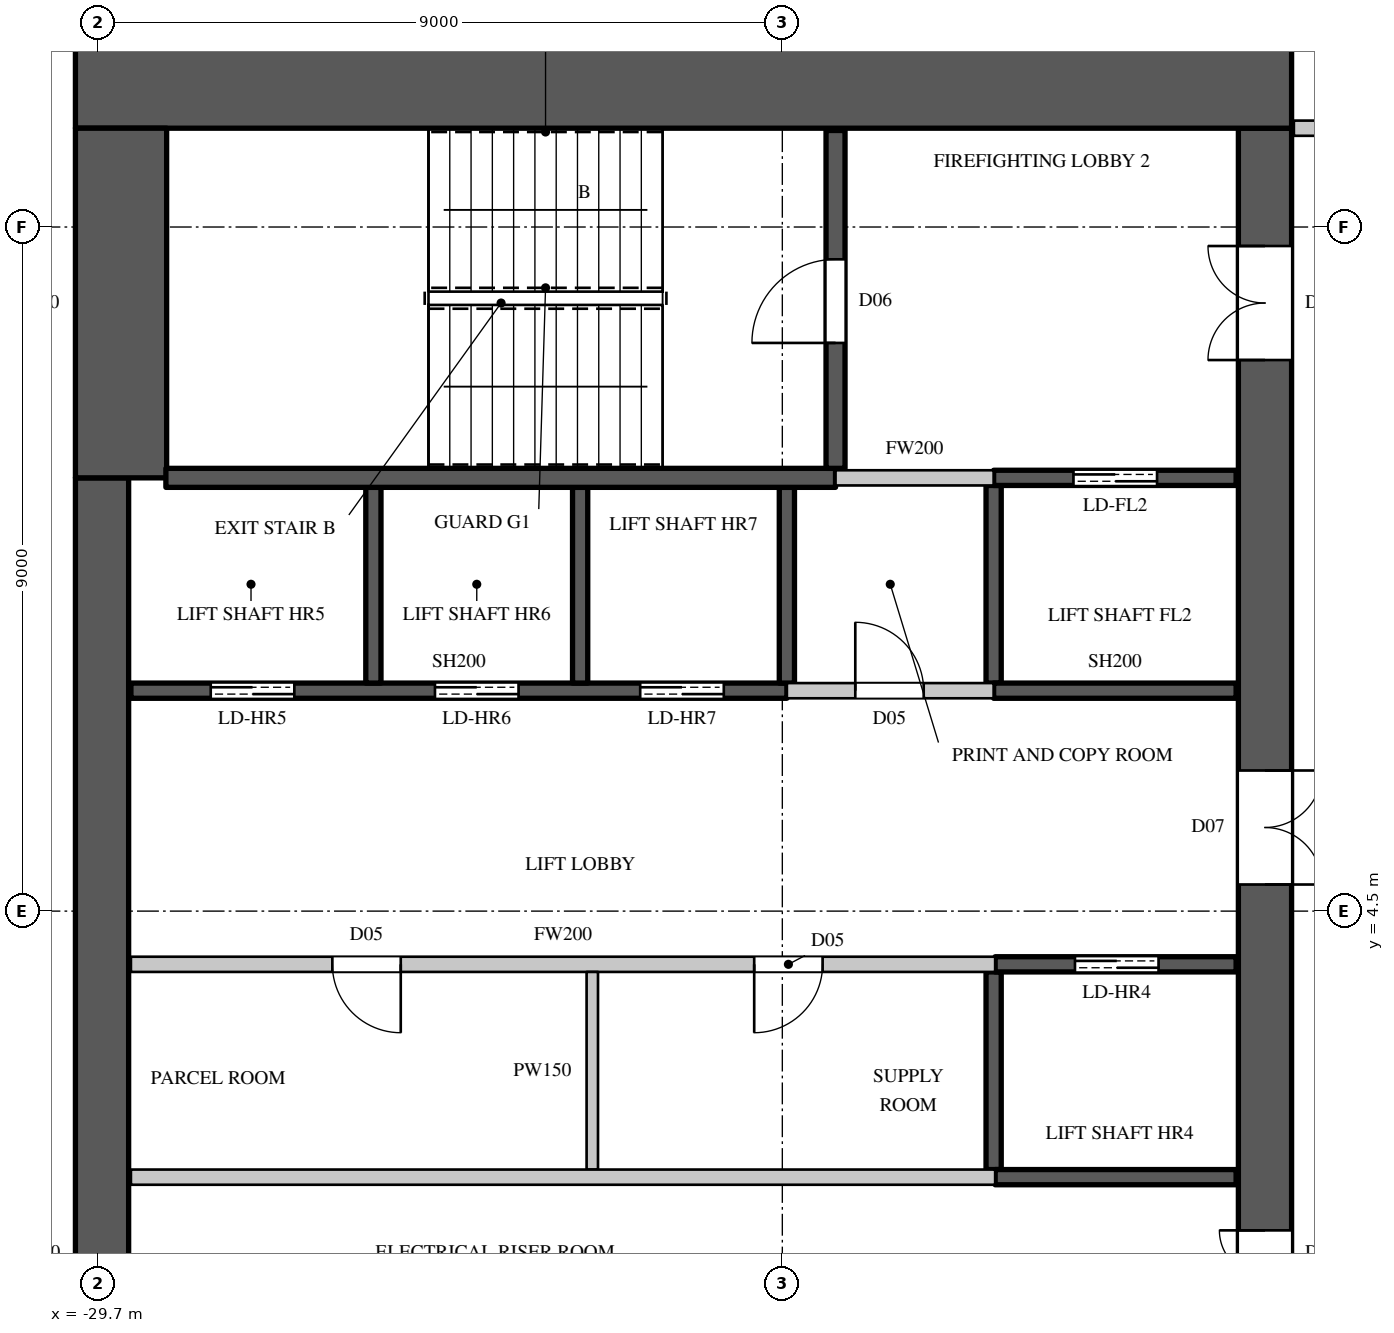
"""IFC4 building model, lengths in metres.
Left out: names, types, materials, properties, quantities, classifications, styles, units other than length and angle.
Written with IfcOpenShell. Run it as: python <this file> out.ifc"""

import sys

from ifc_helpers import new_model, si_unit, direction, frame, frame_2d, origin, place, context, subcontext, project, spatial, rectangle, extrude, element, fill, save


model = new_model("IFC4")
c1 = context("Model", 3, precision=1e-05, world=origin(), true_north=direction((0.0, 1.0)))
c2 = subcontext(c1, "Body", "Model", "MODEL_VIEW")
j1 = project(units=[si_unit("LENGTHUNIT", "METRE"), si_unit("PLANEANGLEUNIT", "RADIAN")], contexts=[c1])
p1 = place(None, origin())
s1 = spatial("IfcSite", under=j1, at=p1, CompositionType="ELEMENT")
p2 = place(p1, origin())
s2 = spatial("IfcBuilding", under=s1, at=p2, CompositionType="ELEMENT")
p3 = place(p2, frame((0.0, 0.0, 247.5)))
s3 = spatial("IfcBuildingStorey", under=s2, at=p3, CompositionType="ELEMENT", Elevation=247.5)
p4 = place(p3, frame((-30.0, 15.4, 0.0), z_axis=(0.0, 0.0, 1.0), x_axis=(1.0, 0.0, 0.0)))
e1 = element("IfcWall", 1, at=p4, inside=s3, PredefinedType="SHEAR", context=c2, shape_type="SweptSolid", body=[
    extrude(rectangle(XDim=16.0, YDim=1.2, at=frame_2d((8.0, 0.0))), origin(), (0.0, 0.0, 1.0), 4.1),
])
p5 = place(p3, frame((-14.35, -14.8, 0.0), z_axis=(0.0, 0.0, 1.0), x_axis=(0.0, 1.0, 0.0)))
e2 = element("IfcWall", 2, at=p5, inside=s3, PredefinedType="SHEAR", context=c2, shape_type="SweptSolid", body=[
    extrude(rectangle(XDim=29.6, YDim=0.7, at=frame_2d((14.8, 0.0))), origin(), (0.0, 0.0, 1.0), 4.1),
])
p6 = place(p5, frame((1.55, 0.0, 0.0)))
e3 = element("IfcOpeningElement", 3, at=p6, cuts=e2, PredefinedType="OPENING", context=c2, shape_type="SweptSolid", body=[
    extrude(rectangle(XDim=1.5, YDim=2.4, at=frame_2d((0.75, 1.2))), frame((0.0, 0.36, 0.0), z_axis=(0.0, -1.0, 0.0), x_axis=(1.0, 0.0, 0.0)), (0.0, 0.0, 1.0), 0.72),
])
p7 = place(p5, frame((26.55, 0.0, 0.0)))
e4 = element("IfcOpeningElement", 4, at=p7, cuts=e2, PredefinedType="OPENING", context=c2, shape_type="SweptSolid", body=[
    extrude(rectangle(XDim=1.5, YDim=2.4, at=frame_2d((0.75, 1.2))), frame((0.0, 0.36, 0.0), z_axis=(0.0, -1.0, 0.0), x_axis=(1.0, 0.0, 0.0)), (0.0, 0.0, 1.0), 0.72),
])
p8 = place(p5, frame((8.45, 0.0, 0.0)))
e5 = element("IfcOpeningElement", 5, at=p8, cuts=e2, PredefinedType="OPENING", context=c2, shape_type="SweptSolid", body=[
    extrude(rectangle(XDim=1.5, YDim=2.4, at=frame_2d((0.75, 1.2))), frame((0.0, 0.36, 0.0), z_axis=(0.0, -1.0, 0.0), x_axis=(1.0, 0.0, 0.0)), (0.0, 0.0, 1.0), 0.72),
])
p9 = place(p5, frame((19.65, 0.0, 0.0)))
e6 = element("IfcOpeningElement", 6, at=p9, cuts=e2, PredefinedType="OPENING", context=c2, shape_type="SweptSolid", body=[
    extrude(rectangle(XDim=1.5, YDim=2.4, at=frame_2d((0.75, 1.2))), frame((0.0, 0.36, 0.0), z_axis=(0.0, -1.0, 0.0), x_axis=(1.0, 0.0, 0.0)), (0.0, 0.0, 1.0), 0.72),
])
p10 = place(p5, frame((14.5, 0.0, 0.0)))
e7 = element("IfcOpeningElement", 7, at=p10, cuts=e2, PredefinedType="OPENING", context=c2, shape_type="SweptSolid", body=[
    extrude(rectangle(XDim=0.6, YDim=2.0, at=frame_2d((0.3, 1.0))), frame((0.0, 0.36, 0.0), z_axis=(0.0, -1.0, 0.0), x_axis=(1.0, 0.0, 0.0)), (0.0, 0.0, 1.0), 0.72),
])
p11 = place(p3, frame((-29.65, -10.2, 0.0), z_axis=(0.0, 0.0, 1.0), x_axis=(0.0, 1.0, 0.0)))
e8 = element("IfcWall", 8, at=p11, inside=s3, PredefinedType="SHEAR", context=c2, shape_type="SweptSolid", body=[
    extrude(rectangle(XDim=20.4, YDim=0.7, at=frame_2d((10.2, 0.0))), origin(), (0.0, 0.0, 1.0), 4.1),
])
p12 = place(p3, frame((-29.4, 10.2, 0.0), z_axis=(0.0, 0.0, 1.0), x_axis=(0.0, 1.0, 0.0)))
e9 = element("IfcWall", 9, at=p12, inside=s3, PredefinedType="SHEAR", context=c2, shape_type="SweptSolid", body=[
    extrude(rectangle(XDim=4.6, YDim=1.2, at=frame_2d((2.3, 0.0))), origin(), (0.0, 0.0, 1.0), 4.1),
])
p13 = place(p3, frame((-29.27, 3.8, 0.0), z_axis=(0.0, 0.0, 1.0), x_axis=(1.0, 0.0, 0.0)))
e10 = element("IfcWall", 10, at=p13, inside=s3, PredefinedType="PARTITIONING", context=c2, shape_type="SweptSolid", body=[
    extrude(rectangle(XDim=11.37, YDim=0.2, at=frame_2d((5.685, 0.0))), origin(), (0.0, 0.0, 1.0), 3.8),
])
p14 = place(p13, frame((2.65, 0.0, 0.0)))
e11 = element("IfcOpeningElement", 11, at=p14, cuts=e10, PredefinedType="OPENING", context=c2, shape_type="SweptSolid", body=[
    extrude(rectangle(XDim=0.9, YDim=2.2, at=frame_2d((0.45, 1.1))), frame((0.0, 0.11, 0.0), z_axis=(0.0, -1.0, 0.0), x_axis=(1.0, 0.0, 0.0)), (0.0, 0.0, 1.0), 0.22),
])
p15 = place(p13, frame((8.2, 0.0, 0.0)))
e12 = element("IfcOpeningElement", 12, at=p15, cuts=e10, PredefinedType="OPENING", context=c2, shape_type="SweptSolid", body=[
    extrude(rectangle(XDim=0.9, YDim=2.2, at=frame_2d((0.45, 1.1))), frame((0.0, 0.11, 0.0), z_axis=(0.0, -1.0, 0.0), x_axis=(1.0, 0.0, 0.0)), (0.0, 0.0, 1.0), 0.22),
])
p16 = place(p3, frame((-20.64, 7.4, 0.0), z_axis=(0.0, 0.0, 1.0), x_axis=(1.0, 0.0, 0.0)))
e13 = element("IfcWall", 13, at=p16, inside=s3, PredefinedType="PARTITIONING", context=c2, shape_type="SweptSolid", body=[
    extrude(rectangle(XDim=2.72, YDim=0.2, at=frame_2d((1.36, 0.0))), origin(), (0.0, 0.0, 1.0), 3.8),
])
p17 = place(p16, frame((0.9, 0.0, 0.0)))
e14 = element("IfcOpeningElement", 14, at=p17, cuts=e13, PredefinedType="OPENING", context=c2, shape_type="SweptSolid", body=[
    extrude(rectangle(XDim=0.9, YDim=2.2, at=frame_2d((0.45, 1.1))), frame((0.0, 0.11, 0.0), z_axis=(0.0, -1.0, 0.0), x_axis=(1.0, 0.0, 0.0)), (0.0, 0.0, 1.0), 0.22),
])
p18 = place(p3, frame((-20.0, 10.2, 0.0), z_axis=(0.0, 0.0, 1.0), x_axis=(1.0, 0.0, 0.0)))
e15 = element("IfcWall", 15, at=p18, inside=s3, PredefinedType="PARTITIONING", context=c2, shape_type="SweptSolid", body=[
    extrude(rectangle(XDim=2.08, YDim=0.2, at=frame_2d((1.04, 0.0))), origin(), (0.0, 0.0, 1.0), 3.8),
])
p19 = place(p3, frame((-13.97, 14.8, 0.0), z_axis=(0.0, 0.0, 1.0), x_axis=(1.0, 0.0, 0.0)))
e16 = element("IfcWall", 16, at=p19, inside=s3, PredefinedType="PARTITIONING", context=c2, shape_type="SweptSolid", body=[
    extrude(rectangle(XDim=2.87, YDim=0.2, at=frame_2d((1.435, 0.0))), origin(), (0.0, 0.0, 1.0), 3.8),
])
p20 = place(p3, frame((-23.2, 1.1, 0.0), z_axis=(0.0, 0.0, 1.0), x_axis=(0.0, 1.0, 0.0)))
e17 = element("IfcWall", 17, at=p20, inside=s3, PredefinedType="PARTITIONING", context=c2, shape_type="SweptSolid", body=[
    extrude(rectangle(XDim=2.6, YDim=0.15, at=frame_2d((1.3, 0.0))), origin(), (0.0, 0.0, 1.0), 3.8),
])
p21 = place(p3, frame((-29.27, 1.0, 0.0), z_axis=(0.0, 0.0, 1.0), x_axis=(1.0, 0.0, 0.0)))
e18 = element("IfcWall", 18, at=p21, inside=s3, PredefinedType="PARTITIONING", context=c2, shape_type="SweptSolid", body=[
    extrude(rectangle(XDim=11.37, YDim=0.2, at=frame_2d((5.685, 0.0))), origin(), (0.0, 0.0, 1.0), 3.8),
])
p22 = place(p3, frame((-29.27, 7.4, 0.0), z_axis=(0.0, 0.0, 1.0), x_axis=(1.0, 0.0, 0.0)))
e19 = element("IfcWall", 19, at=p22, inside=s3, PredefinedType="SHEAR", context=c2, shape_type="SweptSolid", body=[
    extrude(rectangle(XDim=8.63, YDim=0.2, at=frame_2d((4.315, 0.0))), origin(), (0.0, 0.0, 1.0), 3.8),
])
p23 = place(p22, frame((1.05, 0.0, 0.0)))
e20 = element("IfcOpeningElement", 20, at=p23, cuts=e19, PredefinedType="OPENING", context=c2, shape_type="SweptSolid", body=[
    extrude(rectangle(XDim=1.1, YDim=2.2, at=frame_2d((0.55, 1.1))), frame((0.0, 0.11, 0.0), z_axis=(0.0, -1.0, 0.0), x_axis=(1.0, 0.0, 0.0)), (0.0, 0.0, 1.0), 0.22),
])
p24 = place(p22, frame((4.0, 0.0, 0.0)))
e21 = element("IfcOpeningElement", 21, at=p24, cuts=e19, PredefinedType="OPENING", context=c2, shape_type="SweptSolid", body=[
    extrude(rectangle(XDim=1.1, YDim=2.2, at=frame_2d((0.55, 1.1))), frame((0.0, 0.11, 0.0), z_axis=(0.0, -1.0, 0.0), x_axis=(1.0, 0.0, 0.0)), (0.0, 0.0, 1.0), 0.22),
])
p25 = place(p22, frame((6.7, 0.0, 0.0)))
e22 = element("IfcOpeningElement", 22, at=p25, cuts=e19, PredefinedType="OPENING", context=c2, shape_type="SweptSolid", body=[
    extrude(rectangle(XDim=1.1, YDim=2.2, at=frame_2d((0.55, 1.1))), frame((0.0, 0.11, 0.0), z_axis=(0.0, -1.0, 0.0), x_axis=(1.0, 0.0, 0.0)), (0.0, 0.0, 1.0), 0.22),
])
for number, where, z_axis, x_axis in (
    (23, (-26.08, 7.5, 0.0), (0.0, 0.0, 1.0), (0.0, 1.0, 0.0)),
    (24, (-23.36, 7.5, 0.0), (0.0, 0.0, 1.0), (0.0, 1.0, 0.0)),
):
    element("IfcWall", number, at=place(p3, frame(where, z_axis=z_axis, x_axis=x_axis)), inside=s3, PredefinedType="SHEAR", context=c2, shape_type="SweptSolid", body=[
        extrude(rectangle(XDim=2.575, YDim=0.2, at=frame_2d((1.288, 0.0))), origin(), (0.0, 0.0, 1.0), 4.1),
    ])
p26 = place(p3, frame((-20.64, 7.5, 0.0), z_axis=(0.0, 0.0, 1.0), x_axis=(0.0, 1.0, 0.0)))
e25 = element("IfcWall", 25, at=p26, inside=s3, PredefinedType="SHEAR", context=c2, shape_type="SweptSolid", body=[
    extrude(rectangle(XDim=2.575, YDim=0.2, at=frame_2d((1.288, 0.0))), origin(), (0.0, 0.0, 1.0), 3.8),
])
p27 = place(p3, frame((-17.92, 1.1, 0.0), z_axis=(0.0, 0.0, 1.0), x_axis=(0.0, 1.0, 0.0)))
e26 = element("IfcWall", 26, at=p27, inside=s3, PredefinedType="SHEAR", context=c2, shape_type="SweptSolid", body=[
    extrude(rectangle(XDim=2.6, YDim=0.2, at=frame_2d((1.3, 0.0))), origin(), (0.0, 0.0, 1.0), 3.8),
])
p28 = place(p3, frame((-17.9, 1.0, 0.0), z_axis=(0.0, 0.0, 1.0), x_axis=(1.0, 0.0, 0.0)))
e27 = element("IfcWall", 27, at=p28, inside=s3, PredefinedType="SHEAR", context=c2, shape_type="SweptSolid", body=[
    extrude(rectangle(XDim=3.17, YDim=0.2, at=frame_2d((1.585, 0.0))), origin(), (0.0, 0.0, 1.0), 3.8),
])
p29 = place(p3, frame((-17.9, 3.8, 0.0), z_axis=(0.0, 0.0, 1.0), x_axis=(1.0, 0.0, 0.0)))
e28 = element("IfcWall", 28, at=p29, inside=s3, PredefinedType="SHEAR", context=c2, shape_type="SweptSolid", body=[
    extrude(rectangle(XDim=3.17, YDim=0.2, at=frame_2d((1.585, 0.0))), origin(), (0.0, 0.0, 1.0), 3.8),
])
p30 = place(p29, frame((1.05, 0.0, 0.0)))
e29 = element("IfcOpeningElement", 29, at=p30, cuts=e28, PredefinedType="OPENING", context=c2, shape_type="SweptSolid", body=[
    extrude(rectangle(XDim=1.1, YDim=2.2, at=frame_2d((0.55, 1.1))), frame((0.0, 0.11, 0.0), z_axis=(0.0, -1.0, 0.0), x_axis=(1.0, 0.0, 0.0)), (0.0, 0.0, 1.0), 0.22),
])
p31 = place(p3, frame((-17.92, 7.5, 0.0), z_axis=(0.0, 0.0, 1.0), x_axis=(0.0, 1.0, 0.0)))
e30 = element("IfcWall", 30, at=p31, inside=s3, PredefinedType="SHEAR", context=c2, shape_type="SweptSolid", body=[
    extrude(rectangle(XDim=2.6, YDim=0.2, at=frame_2d((1.3, 0.0))), origin(), (0.0, 0.0, 1.0), 3.8),
])
p32 = place(p3, frame((-17.92, 7.4, 0.0), z_axis=(0.0, 0.0, 1.0), x_axis=(1.0, 0.0, 0.0)))
e31 = element("IfcWall", 31, at=p32, inside=s3, PredefinedType="SHEAR", context=c2, shape_type="SweptSolid", body=[
    extrude(rectangle(XDim=3.19, YDim=0.2, at=frame_2d((1.595, 0.0))), origin(), (0.0, 0.0, 1.0), 3.8),
])
p33 = place(p3, frame((-17.92, 10.2, 0.0), z_axis=(0.0, 0.0, 1.0), x_axis=(1.0, 0.0, 0.0)))
e32 = element("IfcWall", 32, at=p33, inside=s3, PredefinedType="SHEAR", context=c2, shape_type="SweptSolid", body=[
    extrude(rectangle(XDim=3.19, YDim=0.2, at=frame_2d((1.595, 0.0))), origin(), (0.0, 0.0, 1.0), 3.8),
])
p34 = place(p33, frame((1.05, 0.0, 0.0)))
e33 = element("IfcOpeningElement", 33, at=p34, cuts=e32, PredefinedType="OPENING", context=c2, shape_type="SweptSolid", body=[
    extrude(rectangle(XDim=1.1, YDim=2.2, at=frame_2d((0.55, 1.1))), frame((0.0, 0.11, 0.0), z_axis=(0.0, -1.0, 0.0), x_axis=(1.0, 0.0, 0.0)), (0.0, 0.0, 1.0), 0.22),
])
p35 = place(p3, frame((-28.81, 10.2, 0.0), z_axis=(0.0, 0.0, 1.0), x_axis=(1.0, 0.0, 0.0)))
e34 = element("IfcWall", 34, at=p35, inside=s3, PredefinedType="SHEAR", context=c2, shape_type="SweptSolid", body=[
    extrude(rectangle(XDim=8.81, YDim=0.25, at=frame_2d((4.405, 0.0))), origin(), (0.0, 0.0, 1.0), 3.8),
])
p36 = place(p3, frame((-20.0, 10.325, 0.0), z_axis=(0.0, 0.0, 1.0), x_axis=(0.0, 1.0, 0.0)))
e35 = element("IfcWall", 35, at=p36, inside=s3, PredefinedType="SHEAR", context=c2, shape_type="SweptSolid", body=[
    extrude(rectangle(XDim=4.445, YDim=0.25, at=frame_2d((2.223, 0.0))), origin(), (0.0, 0.0, 1.0), 3.8),
])
p37 = place(p36, frame((1.65, 0.0, 0.0)))
e36 = element("IfcOpeningElement", 36, at=p37, cuts=e35, PredefinedType="OPENING", context=c2, shape_type="SweptSolid", body=[
    extrude(rectangle(XDim=1.1, YDim=2.2, at=frame_2d((0.55, 1.1))), frame((0.0, 0.135, 0.0), z_axis=(0.0, -1.0, 0.0), x_axis=(1.0, 0.0, 0.0)), (0.0, 0.0, 1.0), 0.27),
])
p38 = place(p37, origin())
e37 = element("IfcDoor", 37, at=p38, inside=s3, OperationType="SINGLE_SWING_LEFT", PredefinedType="DOOR", context=c2, shape_type="SweptSolid", body=[
    extrude(rectangle(XDim=1.1, YDim=2.2, at=frame_2d((0.55, 1.1))), frame((0.0, 0.025, 0.0), z_axis=(0.0, -1.0, 0.0), x_axis=(1.0, 0.0, 0.0)), (0.0, 0.0, 1.0), 0.05),
])
fill(e36, e37)
p39 = place(p14, origin())
e38 = element("IfcDoor", 38, at=p39, inside=s3, OperationType="SINGLE_SWING_LEFT", PredefinedType="DOOR", context=c2, shape_type="SweptSolid", body=[
    extrude(rectangle(XDim=0.9, YDim=2.2, at=frame_2d((0.45, 1.1))), frame((0.0, 0.025, 0.0), z_axis=(0.0, -1.0, 0.0), x_axis=(1.0, 0.0, 0.0)), (0.0, 0.0, 1.0), 0.05),
])
fill(e11, e38)
p40 = place(p15, origin())
e39 = element("IfcDoor", 39, at=p40, inside=s3, OperationType="SINGLE_SWING_RIGHT", PredefinedType="DOOR", context=c2, shape_type="SweptSolid", body=[
    extrude(rectangle(XDim=0.9, YDim=2.2, at=frame_2d((0.45, 1.1))), frame((0.0, 0.025, 0.0), z_axis=(0.0, -1.0, 0.0), x_axis=(1.0, 0.0, 0.0)), (0.0, 0.0, 1.0), 0.05),
])
fill(e12, e39)
p41 = place(p17, origin())
e40 = element("IfcDoor", 40, at=p41, inside=s3, OperationType="SINGLE_SWING_LEFT", PredefinedType="DOOR", context=c2, shape_type="SweptSolid", body=[
    extrude(rectangle(XDim=0.9, YDim=2.2, at=frame_2d((0.45, 1.1))), frame((0.0, 0.025, 0.0), z_axis=(0.0, -1.0, 0.0), x_axis=(1.0, 0.0, 0.0)), (0.0, 0.0, 1.0), 0.05),
])
fill(e14, e40)
p42 = place(p30, origin())
e41 = element("IfcDoor", 41, at=p42, inside=s3, OperationType="DOUBLE_DOOR_SLIDING", PredefinedType="DOOR", context=c2, shape_type="SweptSolid", body=[
    extrude(rectangle(XDim=1.1, YDim=2.2, at=frame_2d((0.55, 1.1))), frame((0.0, 0.025, 0.0), z_axis=(0.0, -1.0, 0.0), x_axis=(1.0, 0.0, 0.0)), (0.0, 0.0, 1.0), 0.05),
])
fill(e29, e41)
p43 = place(p23, origin())
e42 = element("IfcDoor", 42, at=p43, inside=s3, OperationType="DOUBLE_DOOR_SLIDING", PredefinedType="DOOR", context=c2, shape_type="SweptSolid", body=[
    extrude(rectangle(XDim=1.1, YDim=2.2, at=frame_2d((0.55, 1.1))), frame((0.0, 0.025, 0.0), z_axis=(0.0, -1.0, 0.0), x_axis=(1.0, 0.0, 0.0)), (0.0, 0.0, 1.0), 0.05),
])
fill(e20, e42)
p44 = place(p24, origin())
e43 = element("IfcDoor", 43, at=p44, inside=s3, OperationType="DOUBLE_DOOR_SLIDING", PredefinedType="DOOR", context=c2, shape_type="SweptSolid", body=[
    extrude(rectangle(XDim=1.1, YDim=2.2, at=frame_2d((0.55, 1.1))), frame((0.0, 0.025, 0.0), z_axis=(0.0, -1.0, 0.0), x_axis=(1.0, 0.0, 0.0)), (0.0, 0.0, 1.0), 0.05),
])
fill(e21, e43)
p45 = place(p25, origin())
e44 = element("IfcDoor", 44, at=p45, inside=s3, OperationType="DOUBLE_DOOR_SLIDING", PredefinedType="DOOR", context=c2, shape_type="SweptSolid", body=[
    extrude(rectangle(XDim=1.1, YDim=2.2, at=frame_2d((0.55, 1.1))), frame((0.0, 0.025, 0.0), z_axis=(0.0, -1.0, 0.0), x_axis=(1.0, 0.0, 0.0)), (0.0, 0.0, 1.0), 0.05),
])
fill(e22, e44)
p46 = place(p34, origin())
e45 = element("IfcDoor", 45, at=p46, inside=s3, OperationType="DOUBLE_DOOR_SLIDING", PredefinedType="DOOR", context=c2, shape_type="SweptSolid", body=[
    extrude(rectangle(XDim=1.1, YDim=2.2, at=frame_2d((0.55, 1.1))), frame((0.0, 0.025, 0.0), z_axis=(0.0, -1.0, 0.0), x_axis=(1.0, 0.0, 0.0)), (0.0, 0.0, 1.0), 0.05),
])
fill(e33, e45)
p47 = place(p7, origin())
e46 = element("IfcDoor", 46, at=p47, inside=s3, OperationType="DOUBLE_DOOR_SINGLE_SWING", PredefinedType="DOOR", context=c2, shape_type="SweptSolid", body=[
    extrude(rectangle(XDim=1.5, YDim=2.4, at=frame_2d((0.75, 1.2))), frame((0.0, 0.345, 0.0), z_axis=(0.0, -1.0, 0.0), x_axis=(1.0, 0.0, 0.0)), (0.0, 0.0, 1.0), 0.05),
])
fill(e4, e46)
p48 = place(p9, origin())
e47 = element("IfcDoor", 47, at=p48, inside=s3, OperationType="DOUBLE_DOOR_SINGLE_SWING", PredefinedType="DOOR", context=c2, shape_type="SweptSolid", body=[
    extrude(rectangle(XDim=1.5, YDim=2.4, at=frame_2d((0.75, 1.2))), frame((0.0, -0.295, 0.0), z_axis=(0.0, -1.0, 0.0), x_axis=(1.0, 0.0, 0.0)), (0.0, 0.0, 1.0), 0.05),
])
fill(e6, e47)
p49 = place(p10, origin())
e48 = element("IfcDoor", 48, at=p49, inside=s3, OperationType="SINGLE_SWING_RIGHT", PredefinedType="DOOR", context=c2, shape_type="SweptSolid", body=[
    extrude(rectangle(XDim=0.6, YDim=2.0, at=frame_2d((0.3, 1.0))), frame((0.0, 0.345, 0.0), z_axis=(0.0, -1.0, 0.0), x_axis=(1.0, 0.0, 0.0)), (0.0, 0.0, 1.0), 0.05),
])
fill(e7, e48)
save(model, sys.argv[1])
